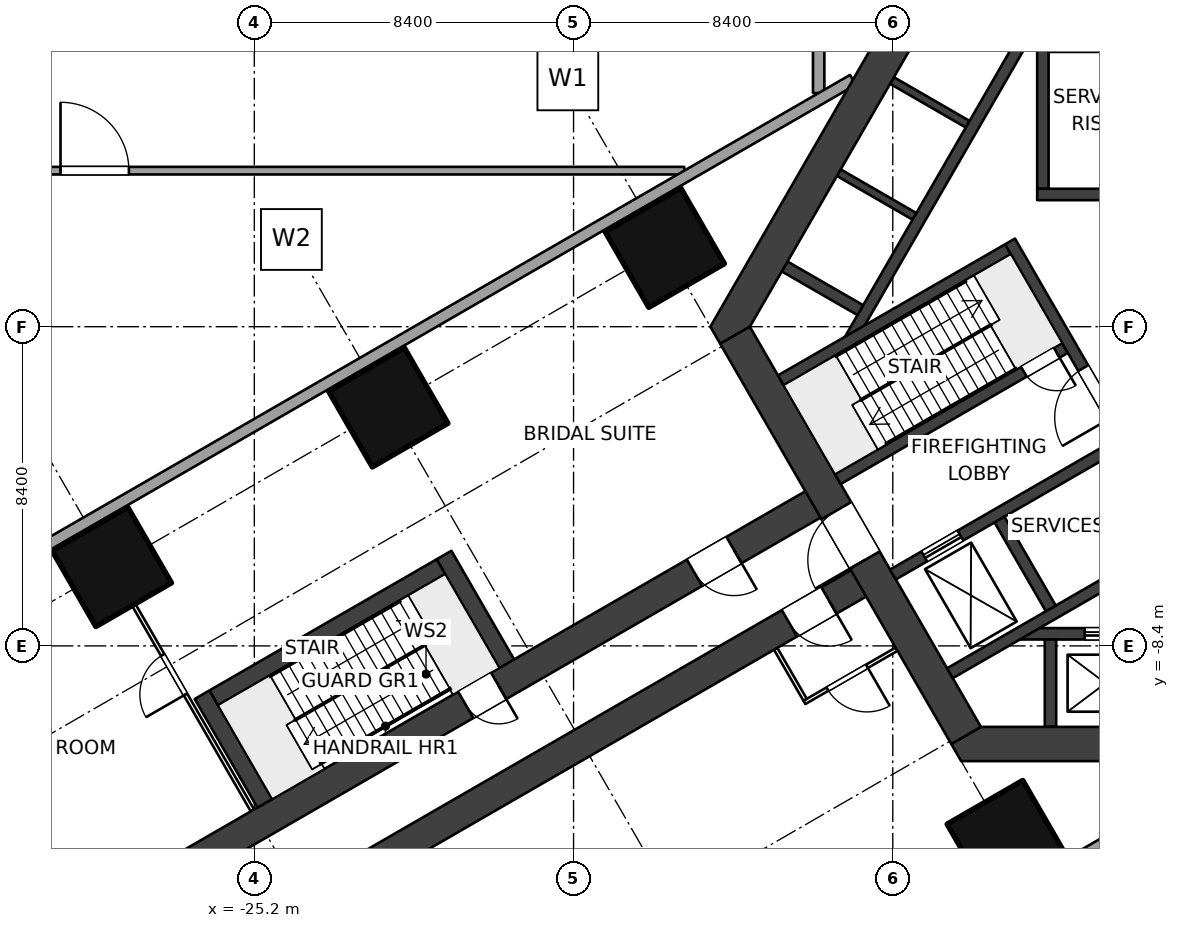
"""IFC4 building model, lengths in metres.
Left out: names, types, materials, properties, quantities, classifications, styles, units other than length and angle.
Written with IfcOpenShell. Run it as: python <this file> out.ifc"""

import sys

from ifc_helpers import new_model, si_unit, direction, frame, frame_2d, origin, origin_2d, place, context, subcontext, project, spatial, polyline, rectangle, outline, extrude, element, fill, save


model = new_model("IFC4")
c1 = context("Model", 3, precision=1e-05, world=origin(), true_north=direction((0.0, 1.0)))
c2 = subcontext(c1, "Body", "Model", "MODEL_VIEW")
j1 = project(units=[si_unit("LENGTHUNIT", "METRE"), si_unit("PLANEANGLEUNIT", "RADIAN")], contexts=[c1])
p1 = place(None, origin())
s1 = spatial("IfcSite", under=j1, at=p1, CompositionType="ELEMENT")
p2 = place(p1, origin())
s2 = spatial("IfcBuilding", under=s1, at=p2, CompositionType="ELEMENT")
p3 = place(p2, frame((0.0, 0.0, 16.0)))
s3 = spatial("IfcBuildingStorey", under=s2, at=p3, CompositionType="ELEMENT", Elevation=16.0)
for number, where, z_axis, x_axis in (
    (1, (-5.4, -13.51, 0.0), (0.0, 0.0, 1.0), (-0.5, 0.866, 0.0)),
    (2, (-14.4, 2.078, 0.0), (0.0, 0.0, 1.0), (-0.5, 0.866, 0.0)),
    (3, (-21.675, -2.122, 0.0), (0.0, 0.0, 1.0), (-0.5, 0.866, 0.0)),
    (4, (-28.949, -6.322, 0.0), (0.0, 0.0, 1.0), (-0.5, 0.866, 0.0)),
):
    element("IfcColumn", number, at=place(p3, frame(where, z_axis=z_axis, x_axis=x_axis)), inside=s3, PredefinedType="COLUMN", context=c2, shape_type="SweptSolid", body=[
        extrude(rectangle(XDim=2.3, YDim=2.3, at=origin_2d()), origin(), (0.0, 0.0, 1.0), 5.0),
    ])
p4 = place(p3, frame((-6.47, -10.757, 0.0), z_axis=(0.0, 0.0, 1.0), x_axis=(-0.499997612506, 0.8660267822, 0.0)))
e5 = element("IfcWall", 5, at=p4, inside=s3, PredefinedType="SHEAR", context=c2, shape_type="SweptSolid", body=[
    extrude(rectangle(XDim=12.161, YDim=0.9, at=frame_2d((6.08, 0.0))), origin(), (0.0, 0.0, 1.0), 5.0),
])
p5 = place(p4, frame((5.33, 0.0, 0.0)))
e6 = element("IfcOpeningElement", 6, at=p5, cuts=e5, PredefinedType="OPENING", context=c2, shape_type="SweptSolid", body=[
    extrude(rectangle(XDim=1.5, YDim=2.1, at=frame_2d((0.75, 1.05))), frame((0.0, 0.46, 0.0), z_axis=(0.0, -1.0, 0.0), x_axis=(1.0, 0.0, 0.0)), (0.0, 0.0, 1.0), 0.92),
])
p6 = place(p3, origin())
e7 = element("IfcWall", 7, at=p6, inside=s3, PredefinedType="SHEAR", context=c2, shape_type="SweptSolid", body=[
    extrude(outline(polyline([(-6.6, -11.432), (6.6, -11.432), (6.86, -10.981), (6.08, -10.531), (-6.08, -10.531), (-6.86, -10.981), (-6.6, -11.432)])), origin(), (0.0, 0.0, 1.0), 5.0),
])
p7 = place(p3, origin())
e8 = element("IfcWall", 8, at=p7, inside=s3, PredefinedType="SHEAR", context=c2, shape_type="SweptSolid", body=[
    extrude(outline(polyline([(-6.6, 11.432), (-13.2, 0.0), (-12.94, -0.45), (-12.161, 0.0), (-6.08, 10.531), (-6.08, 11.432), (-6.6, 11.432)])), origin(), (0.0, 0.0, 1.0), 5.0),
])
p8 = place(p3, frame((-4.6, 3.48, 0.0), z_axis=(0.0, 0.0, 1.0), x_axis=(1.0, 0.0, 0.0)))
e9 = element("IfcWall", 9, at=p8, inside=s3, PredefinedType="SHEAR", context=c2, shape_type="SweptSolid", body=[
    extrude(rectangle(XDim=9.2, YDim=0.3, at=frame_2d((4.6, 0.0))), origin(), (0.0, 0.0, 1.0), 5.0),
])
p9 = place(p8, frame((3.85, 0.0, 0.0)))
e10 = element("IfcOpeningElement", 10, at=p9, cuts=e9, PredefinedType="OPENING", context=c2, shape_type="SweptSolid", body=[
    extrude(rectangle(XDim=1.5, YDim=2.1, at=frame_2d((0.75, 1.05))), frame((0.0, 0.16, 0.0), z_axis=(0.0, -1.0, 0.0), x_axis=(1.0, 0.0, 0.0)), (0.0, 0.0, 1.0), 0.32),
])
p10 = place(p8, frame((1.95, 0.0, 0.0)))
e11 = element("IfcOpeningElement", 11, at=p10, cuts=e9, PredefinedType="OPENING", context=c2, shape_type="SweptSolid", body=[
    extrude(rectangle(XDim=0.9, YDim=2.1, at=frame_2d((0.45, 1.05))), frame((0.0, 0.16, 0.0), z_axis=(0.0, -1.0, 0.0), x_axis=(1.0, 0.0, 0.0)), (0.0, 0.0, 1.0), 0.32),
])
p11 = place(p3, frame((-4.45, 3.63, 0.0), z_axis=(0.0, 0.0, 1.0), x_axis=(0.0, 1.0, 0.0)))
e12 = element("IfcWall", 12, at=p11, inside=s3, PredefinedType="SHEAR", context=c2, shape_type="SweptSolid", body=[
    extrude(rectangle(XDim=6.902, YDim=0.3, at=frame_2d((3.451, 0.0))), origin(), (0.0, 0.0, 1.0), 5.0),
])
p12 = place(p3, frame((-4.3, 7.38, 0.0), z_axis=(0.0, 0.0, 1.0), x_axis=(1.0, 0.0, 0.0)))
e13 = element("IfcWall", 13, at=p12, inside=s3, PredefinedType="SHEAR", context=c2, shape_type="SweptSolid", body=[
    extrude(rectangle(XDim=2.7, YDim=0.3, at=frame_2d((1.35, 0.0))), origin(), (0.0, 0.0, 1.0), 5.0),
])
p13 = place(p3, frame((-0.714, -5.724, 0.0), z_axis=(0.0, 0.0, 1.0), x_axis=(-0.499995050369, 0.866028261437, 0.0)))
e14 = element("IfcWall", 14, at=p13, inside=s3, PredefinedType="SHEAR", context=c2, shape_type="SweptSolid", body=[
    extrude(rectangle(XDim=9.2, YDim=0.3, at=frame_2d((4.6, 0.0))), origin(), (0.0, 0.0, 1.0), 5.0),
])
p14 = place(p13, frame((3.85, 0.0, 0.0)))
e15 = element("IfcOpeningElement", 15, at=p14, cuts=e14, PredefinedType="OPENING", context=c2, shape_type="SweptSolid", body=[
    extrude(rectangle(XDim=1.5, YDim=2.1, at=frame_2d((0.75, 1.05))), frame((0.0, 0.16, 0.0), z_axis=(0.0, -1.0, 0.0), x_axis=(1.0, 0.0, 0.0)), (0.0, 0.0, 1.0), 0.32),
])
p15 = place(p13, frame((1.95, 0.0, 0.0)))
e16 = element("IfcOpeningElement", 16, at=p15, cuts=e14, PredefinedType="OPENING", context=c2, shape_type="SweptSolid", body=[
    extrude(rectangle(XDim=0.9, YDim=2.1, at=frame_2d((0.45, 1.05))), frame((0.0, 0.16, 0.0), z_axis=(0.0, -1.0, 0.0), x_axis=(1.0, 0.0, 0.0)), (0.0, 0.0, 1.0), 0.32),
])
p16 = place(p3, frame((-3.869, -0.559, 0.0), z_axis=(0.0, 0.0, 1.0), x_axis=(-0.86602711848, -0.499997030048, 0.0)))
e17 = element("IfcWall", 17, at=p16, inside=s3, PredefinedType="SHEAR", context=c2, shape_type="SweptSolid", body=[
    extrude(rectangle(XDim=6.901, YDim=0.3, at=frame_2d((3.451, 0.0))), origin(), (0.0, 0.0, 1.0), 5.0),
])
p17 = place(p16, frame((0.25, 0.0, 0.0)))
e18 = element("IfcOpeningElement", 18, at=p17, cuts=e17, PredefinedType="OPENING", context=c2, shape_type="SweptSolid", body=[
    extrude(rectangle(XDim=1.0, YDim=2.1, at=frame_2d((0.5, 1.05))), frame((0.0, 0.16, 0.0), z_axis=(0.0, -1.0, 0.0), x_axis=(1.0, 0.0, 0.0)), (0.0, 0.0, 1.0), 0.32),
])
p18 = place(p3, frame((-5.369, 2.039, 0.0), z_axis=(0.0, 0.0, 1.0), x_axis=(-0.86602711848, -0.499997030048, 0.0)))
e19 = element("IfcWall", 19, at=p18, inside=s3, PredefinedType="SHEAR", context=c2, shape_type="SweptSolid", body=[
    extrude(rectangle(XDim=6.901, YDim=0.3, at=frame_2d((3.451, 0.0))), origin(), (0.0, 0.0, 1.0), 5.0),
])
p19 = place(p3, frame((-2.419, -3.071, 0.0), z_axis=(0.0, 0.0, 1.0), x_axis=(-0.86602711848, -0.499997030048, 0.0)))
e20 = element("IfcWall", 20, at=p19, inside=s3, PredefinedType="SHEAR", context=c2, shape_type="SweptSolid", body=[
    extrude(rectangle(XDim=6.901, YDim=0.3, at=frame_2d((3.451, 0.0))), origin(), (0.0, 0.0, 1.0), 5.0),
])
p20 = place(p19, frame((4.85, 0.0, 0.0)))
e21 = element("IfcOpeningElement", 21, at=p20, cuts=e20, PredefinedType="OPENING", context=c2, shape_type="SweptSolid", body=[
    extrude(rectangle(XDim=1.1, YDim=2.1, at=frame_2d((0.55, 1.05))), frame((0.0, 0.16, 0.0), z_axis=(0.0, -1.0, 0.0), x_axis=(1.0, 0.0, 0.0)), (0.0, 0.0, 1.0), 0.32),
])
p21 = place(p3, frame((-0.919, -5.669, 0.0), z_axis=(0.0, 0.0, 1.0), x_axis=(-0.866011800373, -0.500023561059, 0.0)))
e22 = element("IfcWall", 22, at=p21, inside=s3, PredefinedType="SHEAR", context=c2, shape_type="SweptSolid", body=[
    extrude(rectangle(XDim=6.902, YDim=0.3, at=frame_2d((3.451, 0.0))), origin(), (0.0, 0.0, 1.0), 5.0),
])
p22 = place(p3, frame((-4.241, -7.414, 0.0), z_axis=(0.0, 0.0, 1.0), x_axis=(-0.500048589285, 0.86599734893, 0.0)))
e23 = element("IfcWall", 23, at=p22, inside=s3, PredefinedType="SHEAR", context=c2, shape_type="SweptSolid", body=[
    extrude(rectangle(XDim=2.7, YDim=0.3, at=frame_2d((1.35, 0.0))), origin(), (0.0, 0.0, 1.0), 5.0),
])
p23 = place(p3, frame((5.098, -8.082, 0.0), z_axis=(0.0, 0.0, 1.0), x_axis=(-1.0, 0.0, 0.0)))
e24 = element("IfcWall", 24, at=p23, inside=s3, PredefinedType="SHEAR", context=c2, shape_type="SweptSolid", body=[
    extrude(rectangle(XDim=10.195, YDim=0.3, at=frame_2d((5.098, 0.0))), origin(), (0.0, 0.0, 1.0), 5.0),
])
p24 = place(p23, frame((1.748, 0.0, 0.0)))
e25 = element("IfcOpeningElement", 25, at=p24, cuts=e24, PredefinedType="OPENING", context=c2, shape_type="SweptSolid", body=[
    extrude(rectangle(XDim=1.1, YDim=2.1, at=frame_2d((0.55, 1.05))), frame((0.0, 0.16, 0.0), z_axis=(0.0, -1.0, 0.0), x_axis=(1.0, 0.0, 0.0)), (0.0, 0.0, 1.0), 0.32),
])
p25 = place(p23, frame((4.548, 0.0, 0.0)))
e26 = element("IfcOpeningElement", 26, at=p25, cuts=e24, PredefinedType="OPENING", context=c2, shape_type="SweptSolid", body=[
    extrude(rectangle(XDim=1.1, YDim=2.1, at=frame_2d((0.55, 1.05))), frame((0.0, 0.16, 0.0), z_axis=(0.0, -1.0, 0.0), x_axis=(1.0, 0.0, 0.0)), (0.0, 0.0, 1.0), 0.32),
])
p26 = place(p23, frame((7.348, 0.0, 0.0)))
e27 = element("IfcOpeningElement", 27, at=p26, cuts=e24, PredefinedType="OPENING", context=c2, shape_type="SweptSolid", body=[
    extrude(rectangle(XDim=1.1, YDim=2.1, at=frame_2d((0.55, 1.05))), frame((0.0, 0.16, 0.0), z_axis=(0.0, -1.0, 0.0), x_axis=(1.0, 0.0, 0.0)), (0.0, 0.0, 1.0), 0.32),
])
p27 = place(p3, frame((-4.25, -8.231, 0.0), z_axis=(0.0, 0.0, 1.0), x_axis=(0.0, -1.0, 0.0)))
e28 = element("IfcWall", 28, at=p27, inside=s3, PredefinedType="SHEAR", context=c2, shape_type="SweptSolid", body=[
    extrude(rectangle(XDim=2.3, YDim=0.3, at=frame_2d((1.15, 0.0))), origin(), (0.0, 0.0, 1.0), 5.0),
])
p28 = place(p3, frame((-9.548, -0.374, 0.0), z_axis=(0.0, 0.0, 1.0), x_axis=(0.500002290144, 0.866024081565, 0.0)))
e29 = element("IfcWall", 29, at=p28, inside=s3, PredefinedType="SHEAR", context=c2, shape_type="SweptSolid", body=[
    extrude(rectangle(XDim=10.195, YDim=0.3, at=frame_2d((5.098, 0.0))), origin(), (0.0, 0.0, 1.0), 5.0),
])
p29 = place(p3, frame((-9.254, 0.435, 0.0), z_axis=(0.0, 0.0, 1.0), x_axis=(-0.866007057882, 0.500031774688, 0.0)))
e30 = element("IfcWall", 30, at=p29, inside=s3, PredefinedType="SHEAR", context=c2, shape_type="SweptSolid", body=[
    extrude(rectangle(XDim=2.3, YDim=0.3, at=frame_2d((1.15, 0.0))), origin(), (0.0, 0.0, 1.0), 5.0),
])
for number, where, z_axis, x_axis in (
    (31, (-7.829, 2.903, 0.0), (0.0, 0.0, 1.0), (-0.866, 0.5, 0.0)),
    (32, (-6.429, 5.328, 0.0), (0.0, 0.0, 1.0), (-0.866, 0.5, 0.0)),
):
    element("IfcWall", number, at=place(p3, frame(where, z_axis=z_axis, x_axis=x_axis)), inside=s3, PredefinedType="SHEAR", context=c2, shape_type="SweptSolid", body=[
        extrude(rectangle(XDim=2.3, YDim=0.2, at=frame_2d((1.15, 0.0))), origin(), (0.0, 0.0, 1.0), 5.0),
    ])
p30 = place(p3, frame((-8.91, -6.53, 0.0), z_axis=(0.0, 0.0, 1.0), x_axis=(-0.866025284237, -0.500000207062, 0.0)))
e33 = element("IfcWall", 33, at=p30, inside=s3, PredefinedType="SHEAR", context=c2, shape_type="SweptSolid", body=[
    extrude(rectangle(XDim=36.75, YDim=0.8, at=frame_2d((18.375, 0.0))), origin(), (0.0, 0.0, 1.0), 5.0),
])
p31 = place(p30, frame((1.35, 0.0, 0.0)))
e34 = element("IfcOpeningElement", 34, at=p31, cuts=e33, PredefinedType="OPENING", context=c2, shape_type="SweptSolid", body=[
    extrude(rectangle(XDim=1.2, YDim=2.1, at=frame_2d((0.6, 1.05))), frame((0.0, 0.41, 0.0), z_axis=(0.0, -1.0, 0.0), x_axis=(1.0, 0.0, 0.0)), (0.0, 0.0, 1.0), 0.82),
])
p32 = place(p3, frame((-10.11, -4.451, 0.0), z_axis=(0.0, 0.0, 1.0), x_axis=(-0.866025284237, -0.500000207062, 0.0)))
e35 = element("IfcWall", 35, at=p32, inside=s3, PredefinedType="SHEAR", context=c2, shape_type="SweptSolid", body=[
    extrude(rectangle(XDim=36.75, YDim=0.8, at=frame_2d((18.375, 0.0))), origin(), (0.0, 0.0, 1.0), 5.0),
])
p33 = place(p32, frame((10.0, 0.0, 0.0)))
e36 = element("IfcOpeningElement", 36, at=p33, cuts=e35, PredefinedType="OPENING", context=c2, shape_type="SweptSolid", body=[
    extrude(rectangle(XDim=1.0, YDim=2.1, at=frame_2d((0.5, 1.05))), frame((0.0, 0.41, 0.0), z_axis=(0.0, -1.0, 0.0), x_axis=(1.0, 0.0, 0.0)), (0.0, 0.0, 1.0), 0.82),
])
p34 = place(p32, frame((2.85, 0.0, 0.0)))
e37 = element("IfcOpeningElement", 37, at=p34, cuts=e35, PredefinedType="OPENING", context=c2, shape_type="SweptSolid", body=[
    extrude(rectangle(XDim=1.2, YDim=2.1, at=frame_2d((0.6, 1.05))), frame((0.0, 0.41, 0.0), z_axis=(0.0, -1.0, 0.0), x_axis=(1.0, 0.0, 0.0)), (0.0, 0.0, 1.0), 0.82),
])
p35 = place(p3, frame((-8.3, -8.487, 0.0), z_axis=(0.0, 0.0, 1.0), x_axis=(-0.866034573852, -0.49998411664, 0.0)))
e38 = element("IfcWall", 38, at=p35, inside=s3, PredefinedType="PARTITIONING", context=c2, shape_type="SweptSolid", body=[
    extrude(rectangle(XDim=2.8, YDim=0.1, at=frame_2d((1.4, 0.0))), origin(), (0.0, 0.0, 1.0), 4.7),
])
p36 = place(p35, frame((0.9, 0.0, 0.0)))
e39 = element("IfcOpeningElement", 39, at=p36, cuts=e38, PredefinedType="OPENING", context=c2, shape_type="SweptSolid", body=[
    extrude(rectangle(XDim=1.2, YDim=2.1, at=frame_2d((0.6, 1.05))), frame((0.0, 0.06, 0.0), z_axis=(0.0, -1.0, 0.0), x_axis=(1.0, 0.0, 0.0)), (0.0, 0.0, 1.0), 0.12),
])
p37 = place(p3, frame((-11.482, -8.476, 0.0), z_axis=(0.0, 0.0, 1.0), x_axis=(0.500017819788, -0.86601511528, 0.0)))
e40 = element("IfcWall", 40, at=p37, inside=s3, PredefinedType="PARTITIONING", context=c2, shape_type="SweptSolid", body=[
    extrude(rectangle(XDim=1.55, YDim=0.1, at=frame_2d((0.775, 0.0))), origin(), (0.0, 0.0, 1.0), 4.7),
])
p38 = place(p3, frame((-25.249, -12.73, 0.0), z_axis=(0.0, 0.0, 1.0), x_axis=(-0.499987320047, 0.866032724435, 0.0)))
e41 = element("IfcWall", 41, at=p38, inside=s3, PredefinedType="PARTITIONING", context=c2, shape_type="SweptSolid", body=[
    extrude(rectangle(XDim=6.25, YDim=0.1, at=frame_2d((3.125, 0.0))), origin(), (0.0, 0.0, 1.0), 2.9),
])
p39 = place(p38, frame((3.525, 0.0, 0.0)))
e42 = element("IfcOpeningElement", 42, at=p39, cuts=e41, PredefinedType="OPENING", context=c2, shape_type="SweptSolid", body=[
    extrude(rectangle(XDim=1.2, YDim=2.1, at=frame_2d((0.6, 1.05))), frame((0.0, 0.06, 0.0), z_axis=(0.0, -1.0, 0.0), x_axis=(1.0, 0.0, 0.0)), (0.0, 0.0, 1.0), 0.12),
])
p40 = place(p3, frame((-50.207, 4.106, 0.0), z_axis=(0.0, 0.0, 1.0), x_axis=(1.0, 0.0, 0.0)))
e43 = element("IfcWall", 43, at=p40, inside=s3, PredefinedType="SOLIDWALL", context=c2, shape_type="SweptSolid", body=[
    extrude(rectangle(XDim=36.319, YDim=0.2, at=frame_2d((18.159, 0.0))), origin(), (0.0, 0.0, 1.0), 4.7),
])
p41 = place(p40, frame((19.907, 0.0, 0.0)))
e44 = element("IfcOpeningElement", 44, at=p41, cuts=e43, PredefinedType="OPENING", context=c2, shape_type="SweptSolid", body=[
    extrude(rectangle(XDim=1.8, YDim=2.4, at=frame_2d((0.9, 1.2))), frame((0.0, 0.11, 0.0), z_axis=(0.0, -1.0, 0.0), x_axis=(1.0, 0.0, 0.0)), (0.0, 0.0, 1.0), 0.22),
])
p42 = place(p3, frame((-10.35, 6.149, 0.0), z_axis=(0.0, 0.0, 1.0), x_axis=(0.0, 1.0, 0.0)))
e45 = element("IfcWall", 45, at=p42, inside=s3, PredefinedType="SOLIDWALL", context=c2, shape_type="SweptSolid", body=[
    extrude(rectangle(XDim=41.883, YDim=0.3, at=frame_2d((20.941, 0.0))), origin(), (0.0, 0.0, 1.0), 4.7),
])
p43 = place(p42, frame((25.383, 0.0, 0.0)))
e46 = element("IfcOpeningElement", 46, at=p43, cuts=e45, PredefinedType="OPENING", context=c2, shape_type="SweptSolid", body=[
    extrude(rectangle(XDim=1.8, YDim=2.4, at=frame_2d((0.9, 1.2))), frame((0.0, 0.16, 0.0), z_axis=(0.0, -1.0, 0.0), x_axis=(1.0, 0.0, 0.0)), (0.0, 0.0, 1.0), 0.32),
])
p44 = place(p3, frame((-0.15, -12.038, 0.0), z_axis=(0.0, 0.0, 1.0), x_axis=(-0.866033104117, -0.499986662396, 0.0)))
e47 = element("IfcWall", 47, at=p44, inside=s3, PredefinedType="SOLIDWALL", context=c2, shape_type="SweptSolid", body=[
    extrude(rectangle(XDim=8.879, YDim=0.3, at=frame_2d((4.439, 0.0))), origin(), (0.0, 0.0, 1.0), 4.7),
])
p45 = place(p44, frame((6.504, 0.0, 0.0)))
e48 = element("IfcOpeningElement", 48, at=p45, cuts=e47, PredefinedType="OPENING", context=c2, shape_type="SweptSolid", body=[
    extrude(rectangle(XDim=1.8, YDim=2.4, at=frame_2d((0.9, 1.2))), frame((0.0, 0.16, 0.0), z_axis=(0.0, -1.0, 0.0), x_axis=(1.0, 0.0, 0.0)), (0.0, 0.0, 1.0), 0.32),
])
p46 = place(p3, frame((-9.45, 6.495, 0.0), z_axis=(0.0, 0.0, 1.0), x_axis=(-0.866025301493, -0.500000177174, 0.0)))
e49 = element("IfcWall", 49, at=p46, inside=s3, PredefinedType="SOLIDWALL", context=c2, shape_type="SweptSolid", body=[
    extrude(rectangle(XDim=43.095, YDim=0.3, at=frame_2d((21.548, 0.0))), origin(), (0.0, 0.0, 1.0), 4.7),
])
p47 = place(p46, frame((26.595, 0.0, 0.0)))
e50 = element("IfcOpeningElement", 50, at=p47, cuts=e49, PredefinedType="OPENING", context=c2, shape_type="SweptSolid", body=[
    extrude(rectangle(XDim=1.8, YDim=2.4, at=frame_2d((0.9, 1.2))), frame((0.0, 0.16, 0.0), z_axis=(0.0, -1.0, 0.0), x_axis=(1.0, 0.0, 0.0)), (0.0, 0.0, 1.0), 0.32),
])
for number, where, z_axis, x_axis in (
    (51, (-18.559, -8.868, 0.0), (0.0, 0.0, 1.0), (-0.5, 0.866, 0.0)),
    (52, (-24.925, -12.543, 0.0), (0.0, 0.0, 1.0), (-0.5, 0.866, 0.0)),
):
    element("IfcWall", number, at=place(p3, frame(where, z_axis=z_axis, x_axis=x_axis)), inside=s3, PredefinedType="SOLIDWALL", context=c2, shape_type="SweptSolid", body=[
        extrude(rectangle(XDim=3.3, YDim=0.45, at=frame_2d((1.65, 0.0))), origin(), (0.0, 0.0, 1.0), 5.0),
    ])
p48 = place(p3, frame((-20.292, -6.317, 0.0), z_axis=(0.0, 0.0, 1.0), x_axis=(-0.866028853923, -0.499994024137, 0.0)))
e53 = element("IfcWall", 53, at=p48, inside=s3, PredefinedType="SOLIDWALL", context=c2, shape_type="SweptSolid", body=[
    extrude(rectangle(XDim=6.9, YDim=0.45, at=frame_2d((3.45, 0.0))), origin(), (0.0, 0.0, 1.0), 5.0),
])
p49 = place(p26, origin())
e54 = element("IfcDoor", 54, at=p49, inside=s3, OperationType="DOUBLE_DOOR_SLIDING", PredefinedType="DOOR", context=c2, shape_type="SweptSolid", body=[
    extrude(rectangle(XDim=1.1, YDim=2.1, at=frame_2d((0.55, 1.05))), frame((0.0, 0.025, 0.0), z_axis=(0.0, -1.0, 0.0), x_axis=(1.0, 0.0, 0.0)), (0.0, 0.0, 1.0), 0.05),
])
fill(e27, e54)
p50 = place(p20, origin())
e55 = element("IfcDoor", 55, at=p50, inside=s3, OperationType="DOUBLE_DOOR_SLIDING", PredefinedType="DOOR", context=c2, shape_type="SweptSolid", body=[
    extrude(rectangle(XDim=1.1, YDim=2.1, at=frame_2d((0.55, 1.05))), frame((0.0, 0.025, 0.0), z_axis=(0.0, -1.0, 0.0), x_axis=(1.0, 0.0, 0.0)), (0.0, 0.0, 1.0), 0.05),
])
fill(e21, e55)
p51 = place(p14, origin())
e56 = element("IfcDoor", 56, at=p51, inside=s3, OperationType="DOUBLE_DOOR_DOUBLE_SWING", PredefinedType="DOOR", context=c2, shape_type="SweptSolid", body=[
    extrude(rectangle(XDim=1.5, YDim=2.1, at=frame_2d((0.75, 1.05))), frame((0.0, 0.025, 0.0), z_axis=(0.0, -1.0, 0.0), x_axis=(1.0, 0.0, 0.0)), (0.0, 0.0, 1.0), 0.05),
])
fill(e15, e56)
p52 = place(p17, origin())
e57 = element("IfcDoor", 57, at=p52, inside=s3, OperationType="SINGLE_SWING_LEFT", PredefinedType="DOOR", context=c2, shape_type="SweptSolid", body=[
    extrude(rectangle(XDim=1.0, YDim=2.1, at=frame_2d((0.5, 1.05))), frame((0.0, 0.025, 0.0), z_axis=(0.0, -1.0, 0.0), x_axis=(1.0, 0.0, 0.0)), (0.0, 0.0, 1.0), 0.05),
])
fill(e18, e57)
p53 = place(p5, origin())
e58 = element("IfcDoor", 58, at=p53, inside=s3, OperationType="DOUBLE_DOOR_DOUBLE_SWING", PredefinedType="DOOR", context=c2, shape_type="SweptSolid", body=[
    extrude(rectangle(XDim=1.5, YDim=2.1, at=frame_2d((0.75, 1.05))), frame((0.0, 0.025, 0.0), z_axis=(0.0, -1.0, 0.0), x_axis=(1.0, 0.0, 0.0)), (0.0, 0.0, 1.0), 0.05),
])
fill(e6, e58)
p54 = place(p33, origin())
e59 = element("IfcDoor", 59, at=p54, inside=s3, OperationType="SINGLE_SWING_LEFT", PredefinedType="DOOR", context=c2, shape_type="SweptSolid", body=[
    extrude(rectangle(XDim=1.0, YDim=2.1, at=frame_2d((0.5, 1.05))), frame((0.0, 0.025, 0.0), z_axis=(0.0, -1.0, 0.0), x_axis=(1.0, 0.0, 0.0)), (0.0, 0.0, 1.0), 0.05),
])
fill(e36, e59)
p55 = place(p31, origin())
e60 = element("IfcDoor", 60, at=p55, inside=s3, OperationType="DOUBLE_SWING_LEFT", PredefinedType="DOOR", context=c2, shape_type="SweptSolid", body=[
    extrude(rectangle(XDim=1.2, YDim=2.1, at=frame_2d((0.6, 1.05))), frame((0.0, 0.025, 0.0), z_axis=(0.0, -1.0, 0.0), x_axis=(1.0, 0.0, 0.0)), (0.0, 0.0, 1.0), 0.05),
])
fill(e34, e60)
p56 = place(p36, origin())
e61 = element("IfcDoor", 61, at=p56, inside=s3, OperationType="DOUBLE_SWING_LEFT", PredefinedType="DOOR", context=c2, shape_type="SweptSolid", body=[
    extrude(rectangle(XDim=1.2, YDim=2.1, at=frame_2d((0.6, 1.05))), frame((0.0, 0.025, 0.0), z_axis=(0.0, -1.0, 0.0), x_axis=(1.0, 0.0, 0.0)), (0.0, 0.0, 1.0), 0.05),
])
fill(e39, e61)
p57 = place(p39, origin())
e62 = element("IfcDoor", 62, at=p57, inside=s3, OperationType="DOUBLE_SWING_LEFT", PredefinedType="DOOR", context=c2, shape_type="SweptSolid", body=[
    extrude(rectangle(XDim=1.2, YDim=2.1, at=frame_2d((0.6, 1.05))), frame((0.0, 0.025, 0.0), z_axis=(0.0, -1.0, 0.0), x_axis=(1.0, 0.0, 0.0)), (0.0, 0.0, 1.0), 0.05),
])
fill(e42, e62)
p58 = place(p34, origin())
e63 = element("IfcDoor", 63, at=p58, inside=s3, OperationType="DOUBLE_SWING_LEFT", PredefinedType="DOOR", context=c2, shape_type="SweptSolid", body=[
    extrude(rectangle(XDim=1.2, YDim=2.1, at=frame_2d((0.6, 1.05))), frame((0.0, 0.025, 0.0), z_axis=(0.0, -1.0, 0.0), x_axis=(1.0, 0.0, 0.0)), (0.0, 0.0, 1.0), 0.05),
])
fill(e37, e63)
p59 = place(p41, origin())
e64 = element("IfcDoor", 64, at=p59, inside=s3, OperationType="DOUBLE_DOOR_DOUBLE_SWING", PredefinedType="DOOR", context=c2, shape_type="SweptSolid", body=[
    extrude(rectangle(XDim=1.8, YDim=2.4, at=frame_2d((0.9, 1.2))), frame((0.0, 0.025, 0.0), z_axis=(0.0, -1.0, 0.0), x_axis=(1.0, 0.0, 0.0)), (0.0, 0.0, 1.0), 0.05),
])
fill(e44, e64)
save(model, sys.argv[1])
